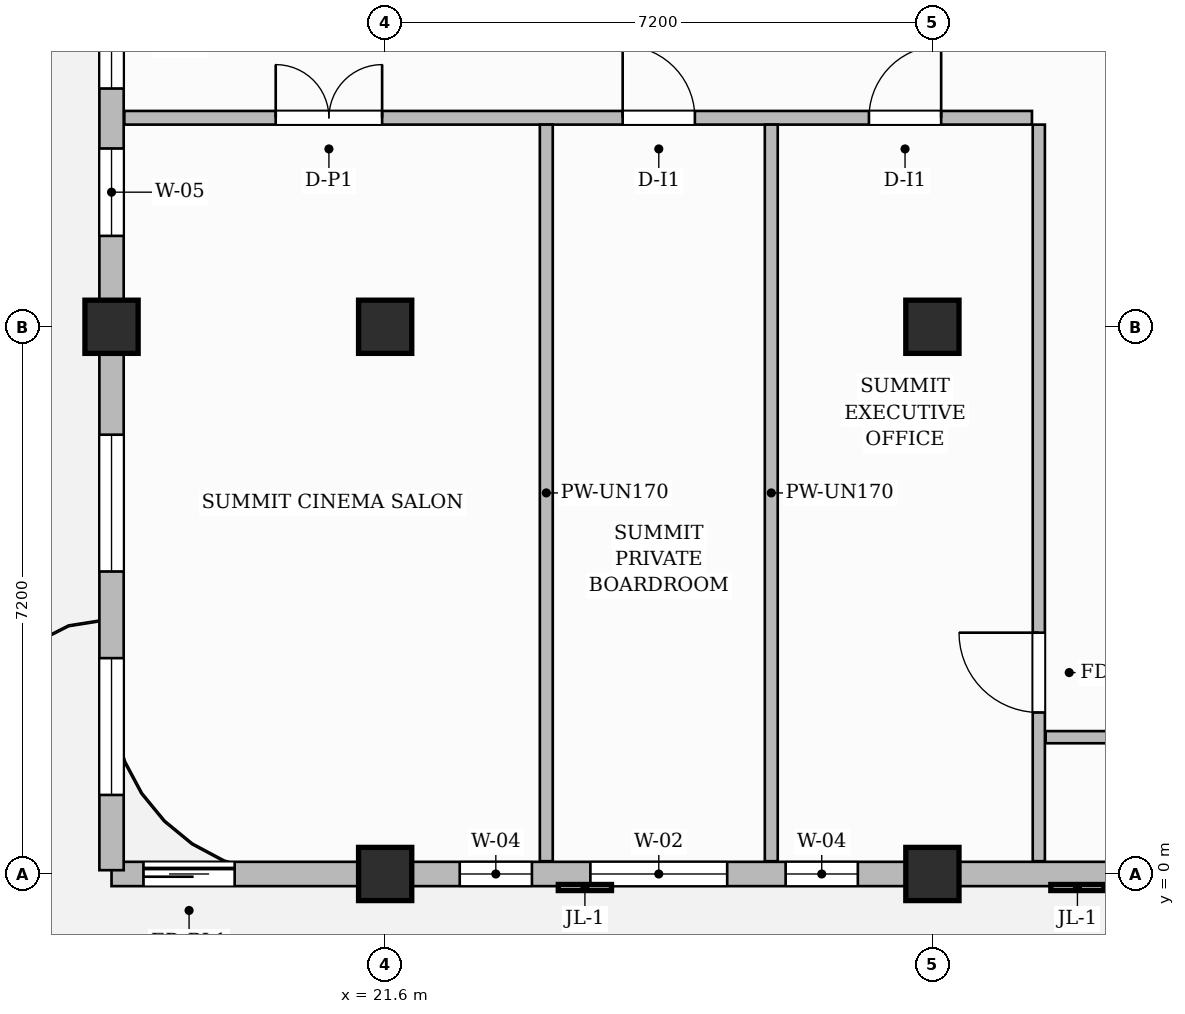
"""IFC4 building model, lengths in metres.
Left out: names, types, materials, properties, quantities, classifications, styles, units other than length and angle.
Written with IfcOpenShell. Run it as: python <this file> out.ifc"""

import sys

from ifc_helpers import new_model, si_unit, direction, frame, frame_2d, origin, origin_2d, place, context, subcontext, project, spatial, rectangle, extrude, source, transform, mapped, element, fill, save


model = new_model("IFC4")
c1 = context("Model", 3, precision=1e-05, world=origin(), true_north=direction((0.0, 1.0)))
c2 = subcontext(c1, "Body", "Model", "MODEL_VIEW")
j1 = project(units=[si_unit("LENGTHUNIT", "METRE"), si_unit("PLANEANGLEUNIT", "RADIAN")], contexts=[c1])
p1 = place(None, origin())
s1 = spatial("IfcSite", under=j1, at=p1, CompositionType="ELEMENT")
p2 = place(p1, origin())
s2 = spatial("IfcBuilding", under=s1, at=p2, CompositionType="ELEMENT")
p3 = place(p2, frame((0.0, 0.0, 278.9)))
s3 = spatial("IfcBuildingStorey", under=s2, at=p3, CompositionType="ELEMENT", Elevation=278.9)
m1 = source(origin(), c2, "Body", "SweptSolid", [
    extrude(rectangle(XDim=0.7, YDim=0.7, at=origin_2d()), origin(), (0.0, 0.0, 1.0), 3.85),
])
for number, where, z_axis, x_axis in (
    (1, (21.6, 0.0, 0.0), (0.0, 0.0, 1.0), (1.0, 0.0, 0.0)),
    (2, (21.6, 7.2, 0.0), (0.0, 0.0, 1.0), (1.0, 0.0, 0.0)),
    (3, (28.8, 0.0, 0.0), (0.0, 0.0, 1.0), (1.0, 0.0, 0.0)),
    (4, (28.8, 7.2, 0.0), (0.0, 0.0, 1.0), (1.0, 0.0, 0.0)),
    (5, (18.0, 7.2, 0.0), (0.0, 0.0, 1.0), (1.0, 0.0, 0.0)),
):
    element("IfcColumn", number, at=place(p3, frame(where, z_axis=z_axis, x_axis=x_axis)), inside=s3, PredefinedType="COLUMN", context=c2, shape_type="MappedRepresentation", body=[
        mapped(m1, transform((0.0, 0.0, 0.0), scale=1.0)),
    ])
p4 = place(p3, frame((18.168, 9.95, 0.0), z_axis=(0.0, 0.0, 1.0), x_axis=(1.0, 0.0, 0.0)))
e6 = element("IfcWall", 6, at=p4, inside=s3, PredefinedType="PARTITIONING", context=c2, shape_type="SweptSolid", body=[
    extrude(rectangle(XDim=11.942, YDim=0.18, at=frame_2d((5.971, 0.0))), origin(), (0.0, 0.0, 1.0), 3.6),
])
p5 = place(p4, frame((1.992, 0.0, 0.0)))
e7 = element("IfcOpeningElement", 7, at=p5, cuts=e6, PredefinedType="OPENING", context=c2, shape_type="SweptSolid", body=[
    extrude(rectangle(XDim=1.4, YDim=2.35, at=frame_2d((0.7, 1.175))), frame((0.0, 0.1, 0.0), z_axis=(0.0, -1.0, 0.0), x_axis=(1.0, 0.0, 0.0)), (0.0, 0.0, 1.0), 0.2),
])
p6 = place(p4, frame((6.557, 0.0, 0.0)))
e8 = element("IfcOpeningElement", 8, at=p6, cuts=e6, PredefinedType="OPENING", context=c2, shape_type="SweptSolid", body=[
    extrude(rectangle(XDim=0.95, YDim=2.15, at=frame_2d((0.475, 1.075))), frame((0.0, 0.1, 0.0), z_axis=(0.0, -1.0, 0.0), x_axis=(1.0, 0.0, 0.0)), (0.0, 0.0, 1.0), 0.2),
])
p7 = place(p4, frame((9.797, 0.0, 0.0)))
e9 = element("IfcOpeningElement", 9, at=p7, cuts=e6, PredefinedType="OPENING", context=c2, shape_type="SweptSolid", body=[
    extrude(rectangle(XDim=0.95, YDim=2.15, at=frame_2d((0.475, 1.075))), frame((0.0, 0.1, 0.0), z_axis=(0.0, -1.0, 0.0), x_axis=(1.0, 0.0, 0.0)), (0.0, 0.0, 1.0), 0.2),
])
p8 = place(p3, frame((30.2, 0.168, 0.0), z_axis=(0.0, 0.0, 1.0), x_axis=(0.0, 1.0, 0.0)))
e10 = element("IfcWall", 10, at=p8, inside=s3, PredefinedType="PARTITIONING", context=c2, shape_type="SweptSolid", body=[
    extrude(rectangle(XDim=9.692, YDim=0.16, at=frame_2d((4.846, 0.0))), origin(), (0.0, 0.0, 1.0), 3.6),
])
p9 = place(p8, frame((1.957, 0.0, 0.0)))
e11 = element("IfcOpeningElement", 11, at=p9, cuts=e10, PredefinedType="OPENING", context=c2, shape_type="SweptSolid", body=[
    extrude(rectangle(XDim=1.05, YDim=2.15, at=frame_2d((0.525, 1.075))), frame((0.0, 0.09, 0.0), z_axis=(0.0, -1.0, 0.0), x_axis=(1.0, 0.0, 0.0)), (0.0, 0.0, 1.0), 0.18),
])
p10 = place(p3, frame((30.29, 1.8, 0.0), z_axis=(0.0, 0.0, 1.0), x_axis=(1.0, 0.0, 0.0)))
e12 = element("IfcWall", 12, at=p10, inside=s3, PredefinedType="PARTITIONING", context=c2, shape_type="SweptSolid", body=[
    extrude(rectangle(XDim=19.37, YDim=0.16, at=frame_2d((9.685, 0.0))), origin(), (0.0, 0.0, 1.0), 3.6),
])
p11 = place(p10, frame((9.735, 0.0, 0.0)))
e13 = element("IfcOpeningElement", 13, at=p11, cuts=e12, PredefinedType="OPENING", context=c2, shape_type="SweptSolid", body=[
    extrude(rectangle(XDim=0.95, YDim=2.15, at=frame_2d((0.475, 1.075))), frame((0.0, 0.09, 0.0), z_axis=(0.0, -1.0, 0.0), x_axis=(1.0, 0.0, 0.0)), (0.0, 0.0, 1.0), 0.18),
])
for number, where, z_axis, x_axis in (
    (14, (23.72, 0.168, 0.0), (0.0, 0.0, 1.0), (0.0, 1.0, 0.0)),
    (15, (26.68, 0.168, 0.0), (0.0, 0.0, 1.0), (0.0, 1.0, 0.0)),
):
    element("IfcWall", number, at=place(p3, frame(where, z_axis=z_axis, x_axis=x_axis)), inside=s3, PredefinedType="PARTITIONING", context=c2, shape_type="SweptSolid", body=[
        extrude(rectangle(XDim=9.692, YDim=0.17, at=frame_2d((4.846, 0.0))), origin(), (0.0, 0.0, 1.0), 3.6),
    ])
p12 = place(p3, frame((18.0, 0.0, 0.0), z_axis=(0.0, 0.0, 1.0), x_axis=(1.0, 0.0, 0.0)))
e16 = element("IfcWall", 16, at=p12, inside=s3, PredefinedType="SOLIDWALL", context=c2, shape_type="SweptSolid", body=[
    extrude(rectangle(XDim=31.8, YDim=0.32, at=frame_2d((15.9, 0.0))), origin(), (0.0, 0.0, 1.0), 3.185),
])
p13 = place(p12, frame((0.42, 0.0, 0.0)))
e17 = element("IfcOpeningElement", 17, at=p13, cuts=e16, PredefinedType="OPENING", context=c2, shape_type="SweptSolid", body=[
    extrude(rectangle(XDim=1.2, YDim=2.2, at=frame_2d((0.6, 1.1))), frame((0.0, 0.17, 0.0), z_axis=(0.0, -1.0, 0.0), x_axis=(1.0, 0.0, 0.0)), (0.0, 0.0, 1.0), 0.34),
])
p14 = place(p12, frame((4.581, 0.0, 0.8)))
e18 = element("IfcOpeningElement", 18, at=p14, cuts=e16, PredefinedType="OPENING", context=c2, shape_type="SweptSolid", body=[
    extrude(rectangle(XDim=0.95, YDim=1.75, at=frame_2d((0.475, 0.875))), frame((0.0, 0.17, 0.0), z_axis=(0.0, -1.0, 0.0), x_axis=(1.0, 0.0, 0.0)), (0.0, 0.0, 1.0), 0.34),
])
p15 = place(p12, frame((6.3, 0.0, 0.8)))
e19 = element("IfcOpeningElement", 19, at=p15, cuts=e16, PredefinedType="OPENING", context=c2, shape_type="SweptSolid", body=[
    extrude(rectangle(XDim=1.8, YDim=1.85, at=frame_2d((0.9, 0.925))), frame((0.0, 0.17, 0.0), z_axis=(0.0, -1.0, 0.0), x_axis=(1.0, 0.0, 0.0)), (0.0, 0.0, 1.0), 0.34),
])
p16 = place(p12, frame((8.869, 0.0, 0.8)))
e20 = element("IfcOpeningElement", 20, at=p16, cuts=e16, PredefinedType="OPENING", context=c2, shape_type="SweptSolid", body=[
    extrude(rectangle(XDim=0.95, YDim=1.75, at=frame_2d((0.475, 0.875))), frame((0.0, 0.17, 0.0), z_axis=(0.0, -1.0, 0.0), x_axis=(1.0, 0.0, 0.0)), (0.0, 0.0, 1.0), 0.34),
])
p17 = place(p12, frame((13.204, 0.0, 0.8)))
e21 = element("IfcOpeningElement", 21, at=p17, cuts=e16, PredefinedType="OPENING", context=c2, shape_type="SweptSolid", body=[
    extrude(rectangle(XDim=1.8, YDim=1.85, at=frame_2d((0.9, 0.925))), frame((0.0, 0.17, 0.0), z_axis=(0.0, -1.0, 0.0), x_axis=(1.0, 0.0, 0.0)), (0.0, 0.0, 1.0), 0.34),
])
p18 = place(p12, frame((18.125, 0.0, 0.8)))
e22 = element("IfcOpeningElement", 22, at=p18, cuts=e16, PredefinedType="OPENING", context=c2, shape_type="SweptSolid", body=[
    extrude(rectangle(XDim=1.8, YDim=1.85, at=frame_2d((0.9, 0.925))), frame((0.0, 0.17, 0.0), z_axis=(0.0, -1.0, 0.0), x_axis=(1.0, 0.0, 0.0)), (0.0, 0.0, 1.0), 0.34),
])
p19 = place(p12, frame((20.875, 0.0, 0.8)))
e23 = element("IfcOpeningElement", 23, at=p19, cuts=e16, PredefinedType="OPENING", context=c2, shape_type="SweptSolid", body=[
    extrude(rectangle(XDim=1.8, YDim=1.85, at=frame_2d((0.9, 0.925))), frame((0.0, 0.17, 0.0), z_axis=(0.0, -1.0, 0.0), x_axis=(1.0, 0.0, 0.0)), (0.0, 0.0, 1.0), 0.34),
])
p20 = place(p12, frame((25.475, 0.0, 0.8)))
e24 = element("IfcOpeningElement", 24, at=p20, cuts=e16, PredefinedType="OPENING", context=c2, shape_type="SweptSolid", body=[
    extrude(rectangle(XDim=1.8, YDim=1.85, at=frame_2d((0.9, 0.925))), frame((0.0, 0.17, 0.0), z_axis=(0.0, -1.0, 0.0), x_axis=(1.0, 0.0, 0.0)), (0.0, 0.0, 1.0), 0.34),
])
p21 = place(p12, frame((28.525, 0.0, 0.8)))
e25 = element("IfcOpeningElement", 25, at=p21, cuts=e16, PredefinedType="OPENING", context=c2, shape_type="SweptSolid", body=[
    extrude(rectangle(XDim=1.8, YDim=1.85, at=frame_2d((0.9, 0.925))), frame((0.0, 0.17, 0.0), z_axis=(0.0, -1.0, 0.0), x_axis=(1.0, 0.0, 0.0)), (0.0, 0.0, 1.0), 0.34),
])
p22 = place(p3, frame((18.0, 0.05, 0.0), z_axis=(0.0, 0.0, 1.0), x_axis=(0.0, 1.0, 0.0)))
e26 = element("IfcWall", 26, at=p22, inside=s3, PredefinedType="SOLIDWALL", context=c2, shape_type="SweptSolid", body=[
    extrude(rectangle(XDim=21.5, YDim=0.32, at=frame_2d((10.75, 0.0))), origin(), (0.0, 0.0, 1.0), 3.6),
])
p23 = place(p22, frame((0.99, 0.0, 0.8)))
e27 = element("IfcOpeningElement", 27, at=p23, cuts=e26, PredefinedType="OPENING", context=c2, shape_type="SweptSolid", body=[
    extrude(rectangle(XDim=1.8, YDim=1.85, at=frame_2d((0.9, 0.925))), frame((0.0, 0.17, 0.0), z_axis=(0.0, -1.0, 0.0), x_axis=(1.0, 0.0, 0.0)), (0.0, 0.0, 1.0), 0.34),
])
p24 = place(p22, frame((3.93, 0.0, 0.8)))
e28 = element("IfcOpeningElement", 28, at=p24, cuts=e26, PredefinedType="OPENING", context=c2, shape_type="SweptSolid", body=[
    extrude(rectangle(XDim=1.8, YDim=1.85, at=frame_2d((0.9, 0.925))), frame((0.0, 0.17, 0.0), z_axis=(0.0, -1.0, 0.0), x_axis=(1.0, 0.0, 0.0)), (0.0, 0.0, 1.0), 0.34),
])
p25 = place(p22, frame((8.346, 0.0, 0.8)))
e29 = element("IfcOpeningElement", 29, at=p25, cuts=e26, PredefinedType="OPENING", context=c2, shape_type="SweptSolid", body=[
    extrude(rectangle(XDim=1.15, YDim=1.8, at=frame_2d((0.575, 0.9))), frame((0.0, 0.17, 0.0), z_axis=(0.0, -1.0, 0.0), x_axis=(1.0, 0.0, 0.0)), (0.0, 0.0, 1.0), 0.34),
])
p26 = place(p22, frame((10.285, 0.0, 0.8)))
e30 = element("IfcOpeningElement", 30, at=p26, cuts=e26, PredefinedType="OPENING", context=c2, shape_type="SweptSolid", body=[
    extrude(rectangle(XDim=1.15, YDim=1.8, at=frame_2d((0.575, 0.9))), frame((0.0, 0.17, 0.0), z_axis=(0.0, -1.0, 0.0), x_axis=(1.0, 0.0, 0.0)), (0.0, 0.0, 1.0), 0.34),
])
p27 = place(p22, frame((12.114, 0.0, 0.8)))
e31 = element("IfcOpeningElement", 31, at=p27, cuts=e26, PredefinedType="OPENING", context=c2, shape_type="SweptSolid", body=[
    extrude(rectangle(XDim=1.15, YDim=1.8, at=frame_2d((0.575, 0.9))), frame((0.0, 0.17, 0.0), z_axis=(0.0, -1.0, 0.0), x_axis=(1.0, 0.0, 0.0)), (0.0, 0.0, 1.0), 0.34),
])
p28 = place(p22, frame((15.406, 0.0, 0.8)))
e32 = element("IfcOpeningElement", 32, at=p28, cuts=e26, PredefinedType="OPENING", context=c2, shape_type="SweptSolid", body=[
    extrude(rectangle(XDim=1.15, YDim=1.8, at=frame_2d((0.575, 0.9))), frame((0.0, 0.17, 0.0), z_axis=(0.0, -1.0, 0.0), x_axis=(1.0, 0.0, 0.0)), (0.0, 0.0, 1.0), 0.34),
])
p29 = place(p22, frame((18.079, 0.0, 0.8)))
e33 = element("IfcOpeningElement", 33, at=p29, cuts=e26, PredefinedType="OPENING", context=c2, shape_type="SweptSolid", body=[
    extrude(rectangle(XDim=1.8, YDim=1.85, at=frame_2d((0.9, 0.925))), frame((0.0, 0.17, 0.0), z_axis=(0.0, -1.0, 0.0), x_axis=(1.0, 0.0, 0.0)), (0.0, 0.0, 1.0), 0.34),
])
m2 = source(origin(), c2, "Body", "SweptSolid", [
    extrude(rectangle(XDim=1.05, YDim=2.15, at=frame_2d((0.525, 1.075))), frame((0.0, 0.025, 0.0), z_axis=(0.0, -1.0, 0.0), x_axis=(1.0, 0.0, 0.0)), (0.0, 0.0, 1.0), 0.05),
])
p30 = place(p9, origin())
e34 = element("IfcDoor", 34, at=p30, inside=s3, OperationType="SINGLE_SWING_RIGHT", PredefinedType="DOOR", context=c2, shape_type="MappedRepresentation", body=[
    mapped(m2, transform((0.0, 0.0, 0.0), scale=1.0)),
])
fill(e11, e34)
m3 = source(origin(), c2, "Body", "SweptSolid", [
    extrude(rectangle(XDim=1.4, YDim=2.35, at=frame_2d((0.7, 1.175))), frame((0.0, 0.025, 0.0), z_axis=(0.0, -1.0, 0.0), x_axis=(1.0, 0.0, 0.0)), (0.0, 0.0, 1.0), 0.05),
])
p31 = place(p5, origin())
e35 = element("IfcDoor", 35, at=p31, inside=s3, OperationType="DOUBLE_DOOR_SINGLE_SWING", PredefinedType="DOOR", context=c2, shape_type="MappedRepresentation", body=[
    mapped(m3, transform((0.0, 0.0, 0.0), scale=1.0)),
])
fill(e7, e35)
m4 = source(origin(), c2, "Body", "SweptSolid", [
    extrude(rectangle(XDim=0.95, YDim=2.15, at=frame_2d((0.475, 1.075))), frame((0.0, 0.025, 0.0), z_axis=(0.0, -1.0, 0.0), x_axis=(1.0, 0.0, 0.0)), (0.0, 0.0, 1.0), 0.05),
])
p32 = place(p6, origin())
e36 = element("IfcDoor", 36, at=p32, inside=s3, OperationType="SINGLE_SWING_LEFT", PredefinedType="DOOR", context=c2, shape_type="MappedRepresentation", body=[
    mapped(m4, transform((0.0, 0.0, 0.0), scale=1.0)),
])
fill(e8, e36)
p33 = place(p7, origin())
e37 = element("IfcDoor", 37, at=p33, inside=s3, OperationType="SINGLE_SWING_RIGHT", PredefinedType="DOOR", context=c2, shape_type="MappedRepresentation", body=[
    mapped(m4, transform((0.0, 0.0, 0.0), scale=1.0)),
])
fill(e9, e37)
m5 = source(origin(), c2, "Body", "SweptSolid", [
    extrude(rectangle(XDim=1.2, YDim=2.2, at=frame_2d((0.6, 1.1))), frame((0.0, 0.025, 0.0), z_axis=(0.0, -1.0, 0.0), x_axis=(1.0, 0.0, 0.0)), (0.0, 0.0, 1.0), 0.05),
])
p34 = place(p13, origin())
e38 = element("IfcDoor", 38, at=p34, inside=s3, OperationType="SLIDING_TO_LEFT", PredefinedType="DOOR", context=c2, shape_type="MappedRepresentation", body=[
    mapped(m5, transform((0.0, 0.0, 0.0), scale=1.0)),
])
fill(e17, e38)
m6 = source(origin(), c2, "Body", "SweptSolid", [
    extrude(rectangle(XDim=0.95, YDim=1.75, at=frame_2d((0.475, 0.875))), frame((0.0, 0.03, 0.0), z_axis=(0.0, -1.0, 0.0), x_axis=(1.0, 0.0, 0.0)), (0.0, 0.0, 1.0), 0.06),
])
p35 = place(p14, origin())
e39 = element("IfcWindow", 39, at=p35, inside=s3, PartitioningType="SINGLE_PANEL", PredefinedType="WINDOW", context=c2, shape_type="MappedRepresentation", body=[
    mapped(m6, transform((0.0, 0.0, 0.0), scale=1.0)),
])
fill(e18, e39)
m7 = source(origin(), c2, "Body", "SweptSolid", [
    extrude(rectangle(XDim=1.8, YDim=1.85, at=frame_2d((0.9, 0.925))), frame((0.0, 0.03, 0.0), z_axis=(0.0, -1.0, 0.0), x_axis=(1.0, 0.0, 0.0)), (0.0, 0.0, 1.0), 0.06),
])
p36 = place(p15, origin())
e40 = element("IfcWindow", 40, at=p36, inside=s3, PartitioningType="DOUBLE_PANEL_VERTICAL", PredefinedType="WINDOW", context=c2, shape_type="MappedRepresentation", body=[
    mapped(m7, transform((0.0, 0.0, 0.0), scale=1.0)),
])
fill(e19, e40)
p37 = place(p16, origin())
e41 = element("IfcWindow", 41, at=p37, inside=s3, PartitioningType="SINGLE_PANEL", PredefinedType="WINDOW", context=c2, shape_type="MappedRepresentation", body=[
    mapped(m6, transform((0.0, 0.0, 0.0), scale=1.0)),
])
fill(e20, e41)
p38 = place(p23, origin())
e42 = element("IfcWindow", 42, at=p38, inside=s3, PartitioningType="DOUBLE_PANEL_VERTICAL", PredefinedType="WINDOW", context=c2, shape_type="MappedRepresentation", body=[
    mapped(m7, transform((0.0, 0.0, 0.0), scale=1.0)),
])
fill(e27, e42)
p39 = place(p24, origin())
e43 = element("IfcWindow", 43, at=p39, inside=s3, PartitioningType="DOUBLE_PANEL_VERTICAL", PredefinedType="WINDOW", context=c2, shape_type="MappedRepresentation", body=[
    mapped(m7, transform((0.0, 0.0, 0.0), scale=1.0)),
])
fill(e28, e43)
m8 = source(origin(), c2, "Body", "SweptSolid", [
    extrude(rectangle(XDim=1.15, YDim=1.8, at=frame_2d((0.575, 0.9))), frame((0.0, 0.03, 0.0), z_axis=(0.0, -1.0, 0.0), x_axis=(1.0, 0.0, 0.0)), (0.0, 0.0, 1.0), 0.06),
])
p40 = place(p25, origin())
e44 = element("IfcWindow", 44, at=p40, inside=s3, PartitioningType="SINGLE_PANEL", PredefinedType="WINDOW", context=c2, shape_type="MappedRepresentation", body=[
    mapped(m8, transform((0.0, 0.0, 0.0), scale=1.0)),
])
fill(e29, e44)
p41 = place(p26, origin())
e45 = element("IfcWindow", 45, at=p41, inside=s3, PartitioningType="SINGLE_PANEL", PredefinedType="WINDOW", context=c2, shape_type="MappedRepresentation", body=[
    mapped(m8, transform((0.0, 0.0, 0.0), scale=1.0)),
])
fill(e30, e45)
save(model, sys.argv[1])
